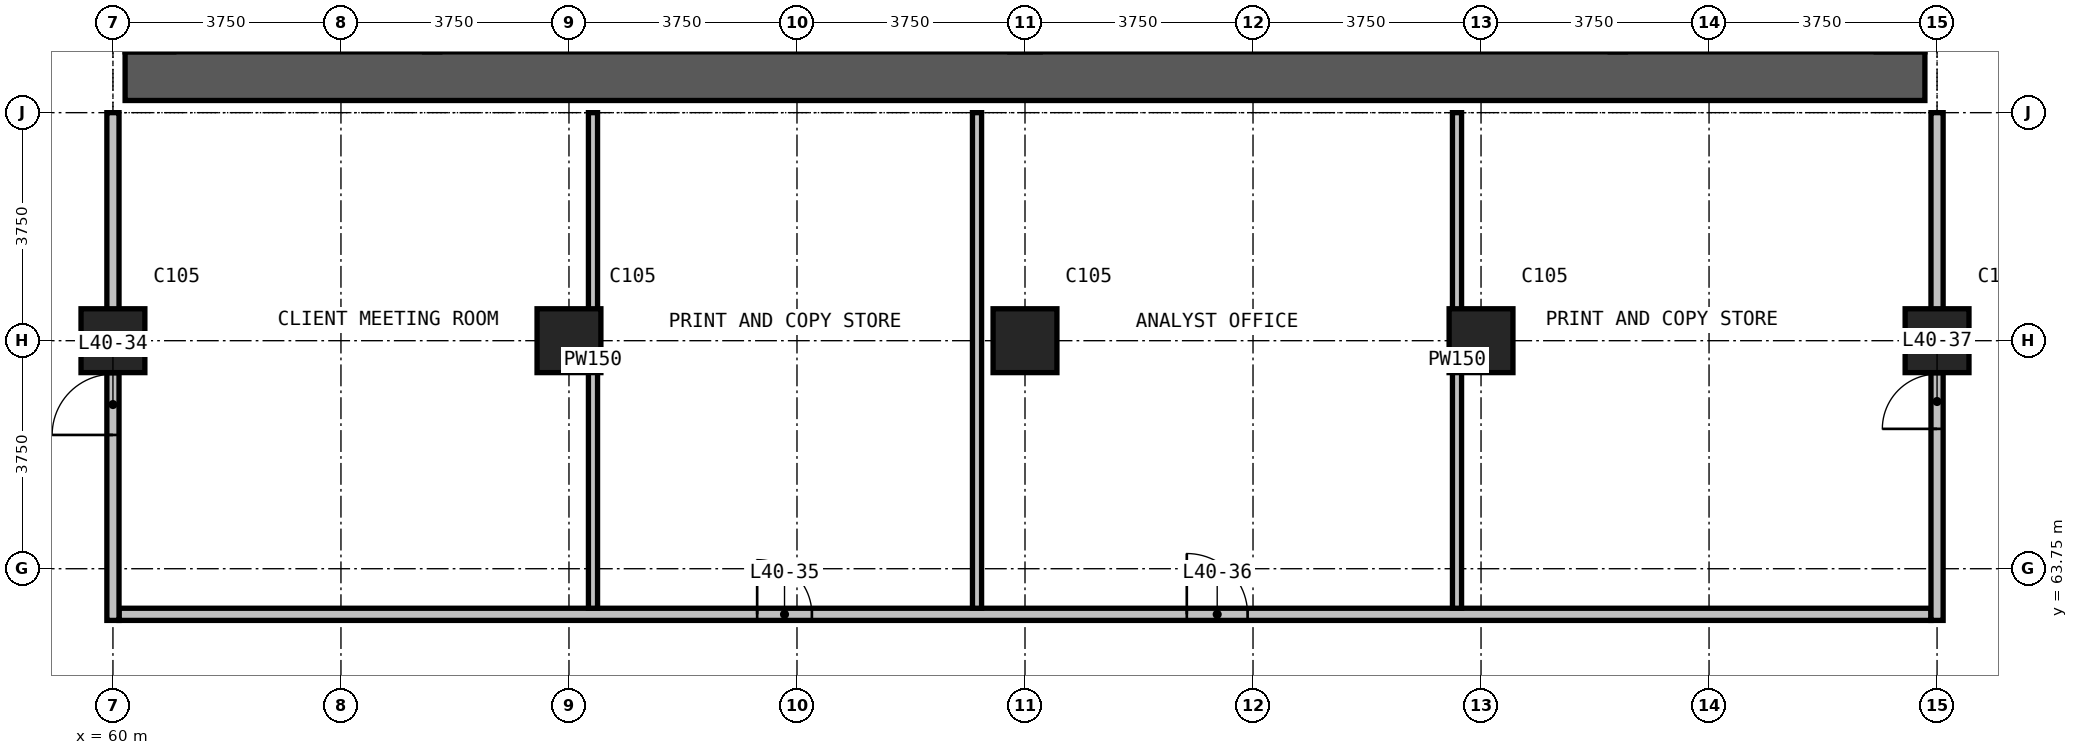
"""IFC4 building model, lengths in metres.
Left out: names, types, materials, properties, quantities, classifications, styles, units other than length and angle.
Written with IfcOpenShell. Run it as: python <this file> out.ifc"""

import sys

from ifc_helpers import new_model, si_unit, direction, frame, frame_2d, origin, origin_2d, place, context, subcontext, project, spatial, rectangle, extrude, element, fill, save


model = new_model("IFC4")
c1 = context("Model", 3, precision=1e-05, world=origin(), true_north=direction((0.0, 1.0)))
c2 = subcontext(c1, "Body", "Model", "MODEL_VIEW")
j1 = project(units=[si_unit("LENGTHUNIT", "METRE"), si_unit("PLANEANGLEUNIT", "RADIAN")], contexts=[c1])
p1 = place(None, origin())
s1 = spatial("IfcSite", under=j1, at=p1, CompositionType="ELEMENT")
p2 = place(p1, origin())
s2 = spatial("IfcBuilding", under=s1, at=p2, CompositionType="ELEMENT")
p3 = place(p2, frame((0.0, 0.0, 158.5)))
s3 = spatial("IfcBuildingStorey", under=s2, at=p3, CompositionType="ELEMENT", Elevation=158.5)
for number, where, z_axis, x_axis in (
    (1, (60.0, 67.5, 0.0), (0.0, 0.0, 1.0), (1.0, 0.0, 0.0)),
    (2, (67.5, 67.5, 0.0), (0.0, 0.0, 1.0), (1.0, 0.0, 0.0)),
    (3, (75.0, 67.5, 0.0), (0.0, 0.0, 1.0), (1.0, 0.0, 0.0)),
    (4, (82.5, 67.5, 0.0), (0.0, 0.0, 1.0), (1.0, 0.0, 0.0)),
    (5, (90.0, 67.5, 0.0), (0.0, 0.0, 1.0), (1.0, 0.0, 0.0)),
):
    element("IfcColumn", number, at=place(p3, frame(where, z_axis=z_axis, x_axis=x_axis)), inside=s3, PredefinedType="COLUMN", context=c2, shape_type="SweptSolid", body=[
        extrude(rectangle(XDim=1.05, YDim=1.05, at=origin_2d()), origin(), (0.0, 0.0, 1.0), 3.6),
    ])
p4 = place(p3, frame((60.2, 71.85, 0.0), z_axis=(0.0, 0.0, 1.0), x_axis=(1.0, 0.0, 0.0)))
e6 = element("IfcWall", 6, at=p4, inside=s3, PredefinedType="SHEAR", context=c2, shape_type="SweptSolid", body=[
    extrude(rectangle(XDim=29.6, YDim=0.8, at=frame_2d((14.8, 0.0))), origin(), (0.0, 0.0, 1.0), 3.6),
])
p5 = place(p3, frame((60.1, 63.0, 0.0), z_axis=(0.0, 0.0, 1.0), x_axis=(1.0, 0.0, 0.0)))
e7 = element("IfcWall", 7, at=p5, inside=s3, PredefinedType="PARTITIONING", context=c2, shape_type="SweptSolid", body=[
    extrude(rectangle(XDim=29.8, YDim=0.2, at=frame_2d((14.9, 0.0))), origin(), (0.0, 0.0, 1.0), 3.3),
])
p6 = place(p5, frame((10.495, 0.0, 0.0)))
e8 = element("IfcOpeningElement", 8, at=p6, cuts=e7, PredefinedType="OPENING", context=c2, shape_type="SweptSolid", body=[
    extrude(rectangle(XDim=0.9, YDim=2.2, at=frame_2d((0.45, 1.1))), frame((0.0, 0.11, 0.0), z_axis=(0.0, -1.0, 0.0), x_axis=(1.0, 0.0, 0.0)), (0.0, 0.0, 1.0), 0.22),
])
p7 = place(p5, frame((17.561, 0.0, 0.0)))
e9 = element("IfcOpeningElement", 9, at=p7, cuts=e7, PredefinedType="OPENING", context=c2, shape_type="SweptSolid", body=[
    extrude(rectangle(XDim=1.0, YDim=2.2, at=frame_2d((0.5, 1.1))), frame((0.0, 0.11, 0.0), z_axis=(0.0, -1.0, 0.0), x_axis=(1.0, 0.0, 0.0)), (0.0, 0.0, 1.0), 0.22),
])
p8 = place(p3, frame((60.0, 62.9, 0.0), z_axis=(0.0, 0.0, 1.0), x_axis=(0.0, 1.0, 0.0)))
e10 = element("IfcWall", 10, at=p8, inside=s3, PredefinedType="PARTITIONING", context=c2, shape_type="SweptSolid", body=[
    extrude(rectangle(XDim=8.35, YDim=0.2, at=frame_2d((4.175, 0.0))), origin(), (0.0, 0.0, 1.0), 3.3),
])
p9 = place(p8, frame((3.05, 0.0, 0.0)))
e11 = element("IfcOpeningElement", 11, at=p9, cuts=e10, PredefinedType="OPENING", context=c2, shape_type="SweptSolid", body=[
    extrude(rectangle(XDim=1.0, YDim=2.2, at=frame_2d((0.5, 1.1))), frame((0.0, 0.11, 0.0), z_axis=(0.0, -1.0, 0.0), x_axis=(1.0, 0.0, 0.0)), (0.0, 0.0, 1.0), 0.22),
])
p10 = place(p3, frame((90.0, 62.9, 0.0), z_axis=(0.0, 0.0, 1.0), x_axis=(0.0, 1.0, 0.0)))
e12 = element("IfcWall", 12, at=p10, inside=s3, PredefinedType="PARTITIONING", context=c2, shape_type="SweptSolid", body=[
    extrude(rectangle(XDim=8.35, YDim=0.2, at=frame_2d((4.175, 0.0))), origin(), (0.0, 0.0, 1.0), 3.3),
])
p11 = place(p10, frame((3.15, 0.0, 0.0)))
e13 = element("IfcOpeningElement", 13, at=p11, cuts=e12, PredefinedType="OPENING", context=c2, shape_type="SweptSolid", body=[
    extrude(rectangle(XDim=0.9, YDim=2.2, at=frame_2d((0.45, 1.1))), frame((0.0, 0.11, 0.0), z_axis=(0.0, -1.0, 0.0), x_axis=(1.0, 0.0, 0.0)), (0.0, 0.0, 1.0), 0.22),
])
for number, where, z_axis, x_axis in (
    (14, (67.895, 63.1, 0.0), (0.0, 0.0, 1.0), (0.0, 1.0, 0.0)),
    (15, (74.211, 63.1, 0.0), (0.0, 0.0, 1.0), (0.0, 1.0, 0.0)),
    (16, (82.105, 63.1, 0.0), (0.0, 0.0, 1.0), (0.0, 1.0, 0.0)),
):
    element("IfcWall", number, at=place(p3, frame(where, z_axis=z_axis, x_axis=x_axis)), inside=s3, PredefinedType="PARTITIONING", context=c2, shape_type="SweptSolid", body=[
        extrude(rectangle(XDim=8.15, YDim=0.15, at=frame_2d((4.075, 0.0))), origin(), (0.0, 0.0, 1.0), 3.3),
    ])
p12 = place(p9, origin())
e17 = element("IfcDoor", 17, at=p12, inside=s3, OperationType="SINGLE_SWING_RIGHT", PredefinedType="DOOR", context=c2, shape_type="SweptSolid", body=[
    extrude(rectangle(XDim=1.0, YDim=2.2, at=frame_2d((0.5, 1.1))), frame((0.0, 0.025, 0.0), z_axis=(0.0, -1.0, 0.0), x_axis=(1.0, 0.0, 0.0)), (0.0, 0.0, 1.0), 0.05),
])
fill(e11, e17)
p13 = place(p6, origin())
e18 = element("IfcDoor", 18, at=p13, inside=s3, OperationType="SINGLE_SWING_LEFT", PredefinedType="DOOR", context=c2, shape_type="SweptSolid", body=[
    extrude(rectangle(XDim=0.9, YDim=2.2, at=frame_2d((0.45, 1.1))), frame((0.0, 0.025, 0.0), z_axis=(0.0, -1.0, 0.0), x_axis=(1.0, 0.0, 0.0)), (0.0, 0.0, 1.0), 0.05),
])
fill(e8, e18)
p14 = place(p7, origin())
e19 = element("IfcDoor", 19, at=p14, inside=s3, OperationType="SINGLE_SWING_LEFT", PredefinedType="DOOR", context=c2, shape_type="SweptSolid", body=[
    extrude(rectangle(XDim=1.0, YDim=2.2, at=frame_2d((0.5, 1.1))), frame((0.0, 0.025, 0.0), z_axis=(0.0, -1.0, 0.0), x_axis=(1.0, 0.0, 0.0)), (0.0, 0.0, 1.0), 0.05),
])
fill(e9, e19)
p15 = place(p11, origin())
e20 = element("IfcDoor", 20, at=p15, inside=s3, OperationType="SINGLE_SWING_RIGHT", PredefinedType="DOOR", context=c2, shape_type="SweptSolid", body=[
    extrude(rectangle(XDim=0.9, YDim=2.2, at=frame_2d((0.45, 1.1))), frame((0.0, 0.025, 0.0), z_axis=(0.0, -1.0, 0.0), x_axis=(1.0, 0.0, 0.0)), (0.0, 0.0, 1.0), 0.05),
])
fill(e13, e20)
save(model, sys.argv[1])
